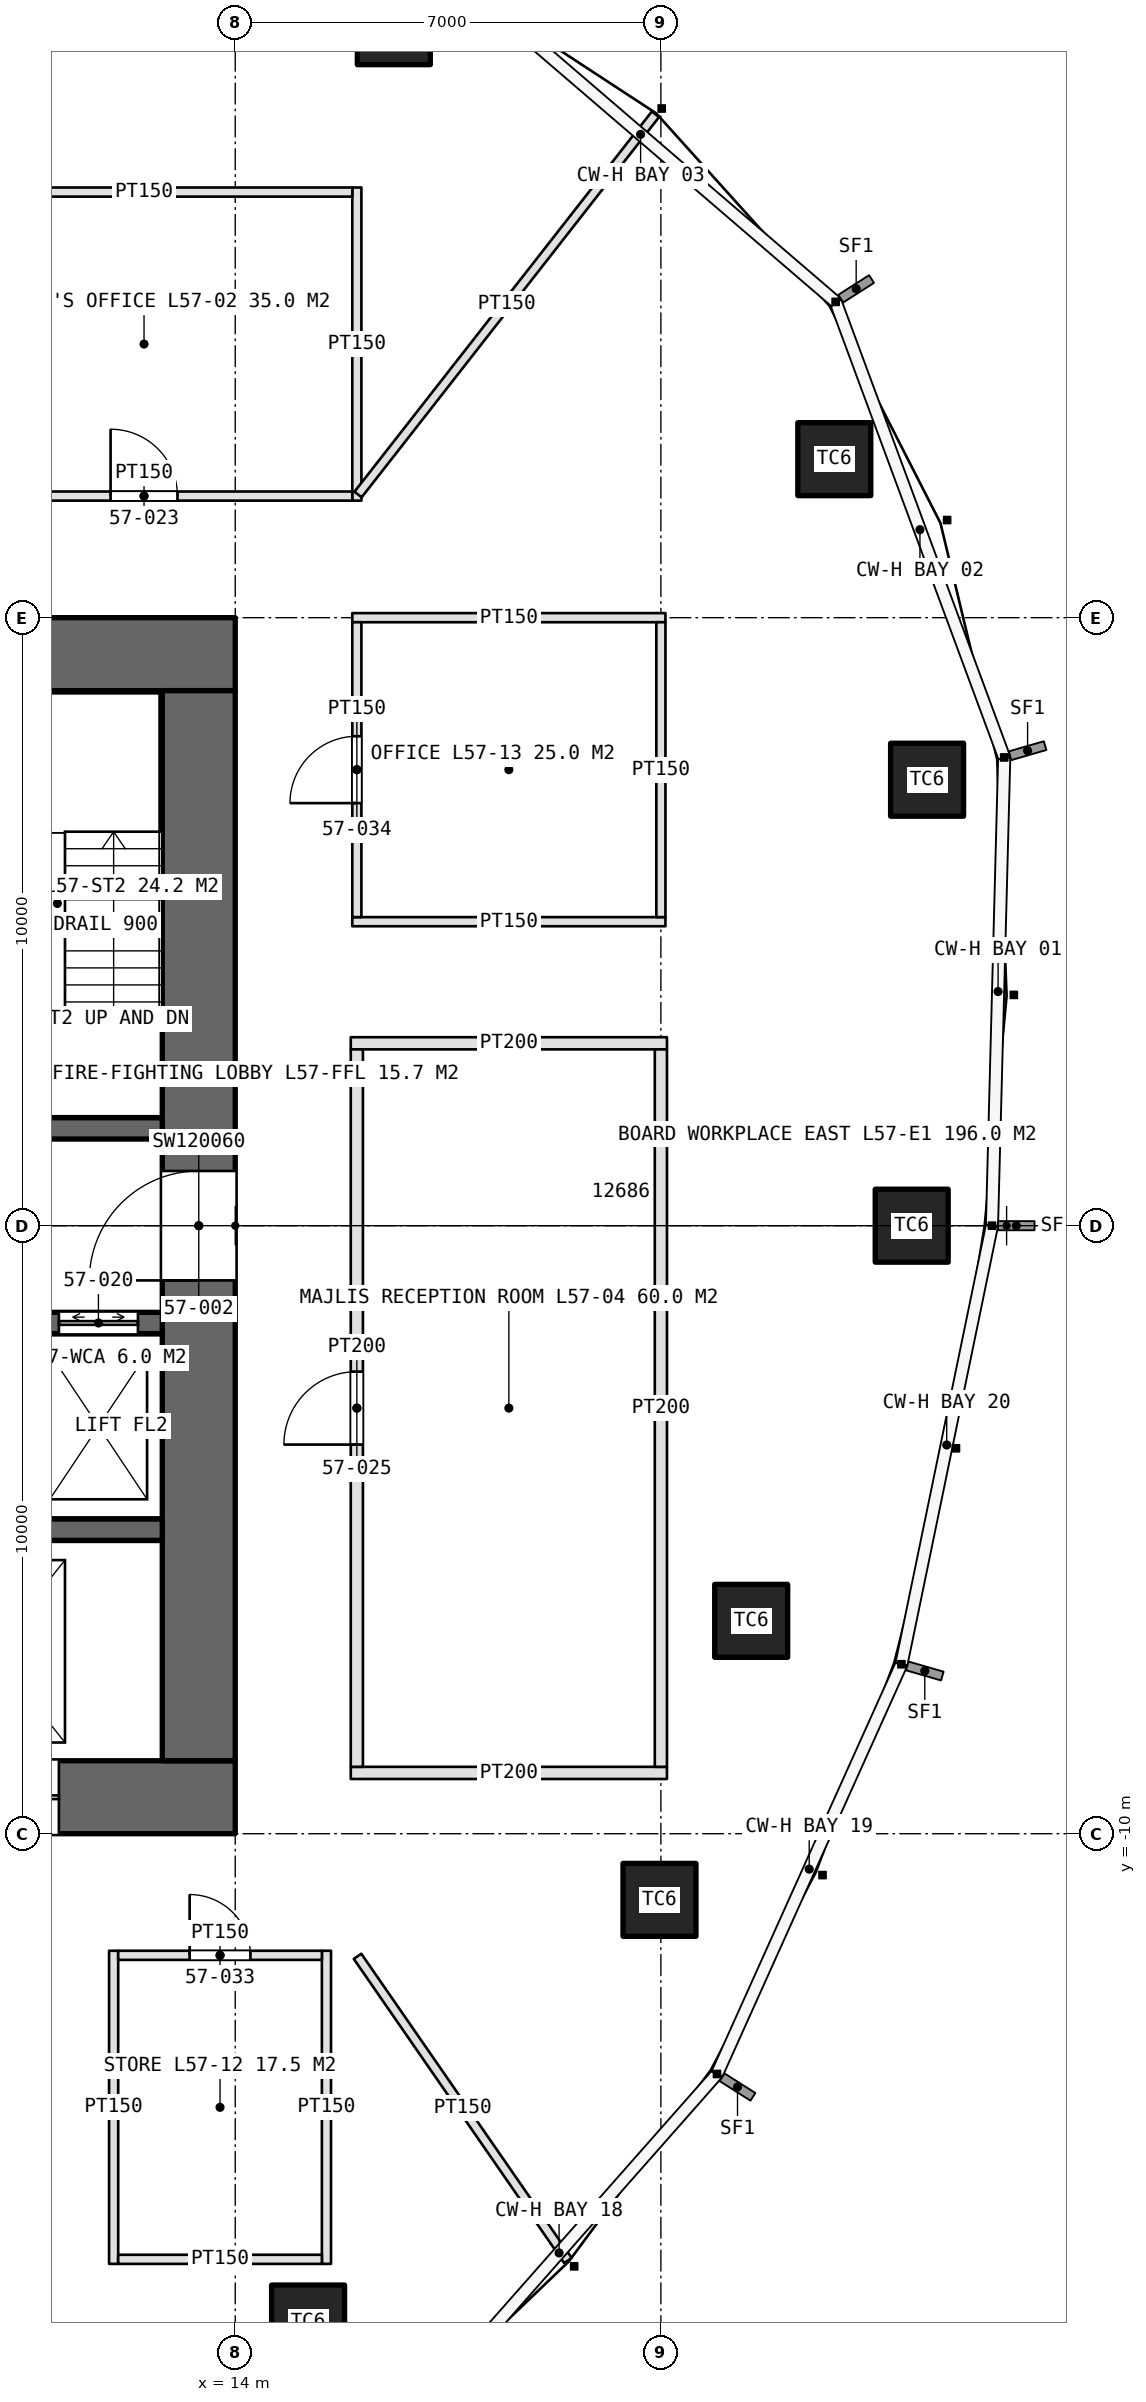
"""IFC4 building model, lengths in metres.
Left out: names, types, materials, properties, quantities, classifications, styles, units other than length and angle.
Written with IfcOpenShell. Run it as: python <this file> out.ifc"""

import sys

from ifc_helpers import new_model, si_unit, direction, frame, frame_2d, origin, origin_2d, place, context, subcontext, project, spatial, rectangle, extrude, element, fill, save


model = new_model("IFC4")
c1 = context("Model", 3, precision=1e-05, world=origin(), true_north=direction((0.0, 1.0)))
c2 = subcontext(c1, "Body", "Model", "MODEL_VIEW")
j1 = project(units=[si_unit("LENGTHUNIT", "METRE"), si_unit("PLANEANGLEUNIT", "RADIAN")], contexts=[c1])
p1 = place(None, origin())
s1 = spatial("IfcSite", under=j1, at=p1, CompositionType="ELEMENT")
p2 = place(p1, origin())
s2 = spatial("IfcBuilding", under=s1, at=p2, CompositionType="ELEMENT")
p3 = place(p2, frame((0.0, 0.0, 257.8)))
s3 = spatial("IfcBuildingStorey", under=s2, at=p3, CompositionType="ELEMENT", Elevation=257.8)
p4 = place(p3, frame((-14.0, -9.4, 0.0), z_axis=(0.0, 0.0, 1.0), x_axis=(1.0, 0.0, 0.0)))
e1 = element("IfcWall", 1, at=p4, inside=s3, PredefinedType="SHEAR", context=c2, shape_type="SweptSolid", body=[
    extrude(rectangle(XDim=28.0, YDim=1.2, at=frame_2d((14.0, 0.0))), origin(), (0.0, 0.0, 1.0), 4.2),
])
p5 = place(p4, frame((22.9, 0.0, 0.0)))
e2 = element("IfcOpeningElement", 2, at=p5, cuts=e1, PredefinedType="OPENING", context=c2, shape_type="SweptSolid", body=[
    extrude(rectangle(XDim=2.2, YDim=2.7, at=frame_2d((1.1, 1.35))), frame((0.0, 0.61, 0.0), z_axis=(0.0, -1.0, 0.0), x_axis=(1.0, 0.0, 0.0)), (0.0, 0.0, 1.0), 1.22),
])
p6 = place(p3, frame((14.0, 9.4, 0.0), z_axis=(0.0, 0.0, 1.0), x_axis=(-1.0, 0.0, 0.0)))
e3 = element("IfcWall", 3, at=p6, inside=s3, PredefinedType="SHEAR", context=c2, shape_type="SweptSolid", body=[
    extrude(rectangle(XDim=28.0, YDim=1.2, at=frame_2d((14.0, 0.0))), origin(), (0.0, 0.0, 1.0), 4.2),
])
p7 = place(p6, frame((24.0, 0.0, 0.0)))
e4 = element("IfcOpeningElement", 4, at=p7, cuts=e3, PredefinedType="OPENING", context=c2, shape_type="SweptSolid", body=[
    extrude(rectangle(XDim=1.0, YDim=2.4, at=frame_2d((0.5, 1.2))), frame((0.0, 0.61, 0.0), z_axis=(0.0, -1.0, 0.0), x_axis=(1.0, 0.0, 0.0)), (0.0, 0.0, 1.0), 1.22),
])
p8 = place(p3, frame((13.4, -8.8, 0.0), z_axis=(0.0, 0.0, 1.0), x_axis=(0.0, 1.0, 0.0)))
e5 = element("IfcWall", 5, at=p8, inside=s3, PredefinedType="SHEAR", context=c2, shape_type="SweptSolid", body=[
    extrude(rectangle(XDim=17.6, YDim=1.2, at=frame_2d((8.8, 0.0))), origin(), (0.0, 0.0, 1.0), 4.2),
])
p9 = place(p8, frame((7.9, 0.0, 0.0)))
e6 = element("IfcOpeningElement", 6, at=p9, cuts=e5, PredefinedType="OPENING", context=c2, shape_type="SweptSolid", body=[
    extrude(rectangle(XDim=1.8, YDim=2.4, at=frame_2d((0.9, 1.2))), frame((0.0, 0.61, 0.0), z_axis=(0.0, -1.0, 0.0), x_axis=(1.0, 0.0, 0.0)), (0.0, 0.0, 1.0), 1.22),
])
p10 = place(p3, frame((7.2, 1.6, 0.0), z_axis=(0.0, 0.0, 1.0), x_axis=(1.0, 0.0, 0.0)))
e7 = element("IfcWall", 7, at=p10, inside=s3, PredefinedType="SHEAR", context=c2, shape_type="SweptSolid", body=[
    extrude(rectangle(XDim=5.6, YDim=0.35, at=frame_2d((2.8, 0.0))), origin(), (0.0, 0.0, 1.0), 4.2),
])
p11 = place(p10, frame((0.6, 0.0, 0.0)))
e8 = element("IfcOpeningElement", 8, at=p11, cuts=e7, PredefinedType="OPENING", context=c2, shape_type="SweptSolid", body=[
    extrude(rectangle(XDim=1.0, YDim=2.4, at=frame_2d((0.5, 1.2))), frame((0.0, 0.185, 0.0), z_axis=(0.0, -1.0, 0.0), x_axis=(1.0, 0.0, 0.0)), (0.0, 0.0, 1.0), 0.37),
])
p12 = place(p3, frame((7.2, -1.6, 0.0), z_axis=(0.0, 0.0, 1.0), x_axis=(1.0, 0.0, 0.0)))
e9 = element("IfcWall", 9, at=p12, inside=s3, PredefinedType="SHEAR", context=c2, shape_type="SweptSolid", body=[
    extrude(rectangle(XDim=5.6, YDim=0.35, at=frame_2d((2.8, 0.0))), origin(), (0.0, 0.0, 1.0), 4.2),
])
p13 = place(p12, frame((0.9, 0.0, 0.0)))
e10 = element("IfcOpeningElement", 10, at=p13, cuts=e9, PredefinedType="OPENING", context=c2, shape_type="SweptSolid", body=[
    extrude(rectangle(XDim=1.3, YDim=2.4, at=frame_2d((0.65, 1.2))), frame((0.0, 0.185, 0.0), z_axis=(0.0, -1.0, 0.0), x_axis=(1.0, 0.0, 0.0)), (0.0, 0.0, 1.0), 0.37),
])
p14 = place(p12, frame((3.9, 0.0, 0.0)))
e11 = element("IfcOpeningElement", 11, at=p14, cuts=e9, PredefinedType="OPENING", context=c2, shape_type="SweptSolid", body=[
    extrude(rectangle(XDim=1.3, YDim=2.4, at=frame_2d((0.65, 1.2))), frame((0.0, 0.185, 0.0), z_axis=(0.0, -1.0, 0.0), x_axis=(1.0, 0.0, 0.0)), (0.0, 0.0, 1.0), 0.37),
])
p15 = place(p3, frame((7.2, -5.0, 0.0), z_axis=(0.0, 0.0, 1.0), x_axis=(1.0, 0.0, 0.0)))
e12 = element("IfcWall", 12, at=p15, inside=s3, PredefinedType="SHEAR", context=c2, shape_type="SweptSolid", body=[
    extrude(rectangle(XDim=5.6, YDim=0.35, at=frame_2d((2.8, 0.0))), origin(), (0.0, 0.0, 1.0), 4.2),
])
for number, where, z_axis, x_axis in (
    (13, (25.125, 0.0, 0.0), (0.0, 0.0, 1.0), (1.0, 0.0, 0.0)),
    (14, (25.378, 7.335, 0.0), (0.0, 0.0, 1.0), (1.0, 0.0, 0.0)),
    (15, (23.852, 12.607, 0.0), (0.0, 0.0, 1.0), (1.0, 0.0, 0.0)),
    (16, (16.608, 19.695, 0.0), (0.0, 0.0, 1.0), (1.0, 0.0, 0.0)),
    (17, (15.198, -18.023, 0.0), (0.0, 0.0, 1.0), (1.0, 0.0, 0.0)),
    (18, (20.977, -11.088, 0.0), (0.0, 0.0, 1.0), (1.0, 0.0, 0.0)),
    (19, (22.485, -6.499, 0.0), (0.0, 0.0, 1.0), (1.0, 0.0, 0.0)),
):
    element("IfcColumn", number, at=place(p3, frame(where, z_axis=z_axis, x_axis=x_axis)), inside=s3, PredefinedType="COLUMN", context=c2, shape_type="SweptSolid", body=[
        extrude(rectangle(XDim=1.2, YDim=1.2, at=origin_2d()), origin(), (0.0, 0.0, 1.0), 4.2),
    ])
p16 = place(p3, frame((16.0, 11.925, 0.0), z_axis=(0.0, 0.0, 1.0), x_axis=(0.0, 1.0, 0.0)))
e20 = element("IfcWall", 20, at=p16, inside=s3, PredefinedType="PARTITIONING", context=c2, shape_type="SweptSolid", body=[
    extrude(rectangle(XDim=5.15, YDim=0.15, at=frame_2d((2.575, 0.0))), origin(), (0.0, 0.0, 1.0), 3.0),
])
p17 = place(p3, frame((9.075, 12.0, 0.0), z_axis=(0.0, 0.0, 1.0), x_axis=(1.0, 0.0, 0.0)))
e21 = element("IfcWall", 21, at=p17, inside=s3, PredefinedType="PARTITIONING", context=c2, shape_type="SweptSolid", body=[
    extrude(rectangle(XDim=6.85, YDim=0.15, at=frame_2d((3.425, 0.0))), origin(), (0.0, 0.0, 1.0), 3.0),
])
p18 = place(p17, frame((2.875, 0.0, 0.0)))
e22 = element("IfcOpeningElement", 22, at=p18, cuts=e21, PredefinedType="OPENING", context=c2, shape_type="SweptSolid", body=[
    extrude(rectangle(XDim=1.1, YDim=2.3, at=frame_2d((0.55, 1.15))), frame((0.0, 0.085, 0.0), z_axis=(0.0, -1.0, 0.0), x_axis=(1.0, 0.0, 0.0)), (0.0, 0.0, 1.0), 0.17),
])
p19 = place(p3, frame((9.075, 17.0, 0.0), z_axis=(0.0, 0.0, 1.0), x_axis=(1.0, 0.0, 0.0)))
e23 = element("IfcWall", 23, at=p19, inside=s3, PredefinedType="PARTITIONING", context=c2, shape_type="SweptSolid", body=[
    extrude(rectangle(XDim=6.85, YDim=0.15, at=frame_2d((3.425, 0.0))), origin(), (0.0, 0.0, 1.0), 3.0),
])
for number, where, z_axis, x_axis in (
    (24, (15.9, -9.0, 0.0), (0.0, 0.0, 1.0), (1.0, 0.0, 0.0)),
    (25, (15.9, 3.0, 0.0), (0.0, 0.0, 1.0), (1.0, 0.0, 0.0)),
):
    element("IfcWall", number, at=place(p3, frame(where, z_axis=z_axis, x_axis=x_axis)), inside=s3, PredefinedType="PARTITIONING", context=c2, shape_type="SweptSolid", body=[
        extrude(rectangle(XDim=5.2, YDim=0.2, at=frame_2d((2.6, 0.0))), origin(), (0.0, 0.0, 1.0), 3.0),
    ])
p20 = place(p3, frame((16.0, -8.9, 0.0), z_axis=(0.0, 0.0, 1.0), x_axis=(0.0, 1.0, 0.0)))
e26 = element("IfcWall", 26, at=p20, inside=s3, PredefinedType="PARTITIONING", context=c2, shape_type="SweptSolid", body=[
    extrude(rectangle(XDim=11.8, YDim=0.2, at=frame_2d((5.9, 0.0))), origin(), (0.0, 0.0, 1.0), 3.0),
])
p21 = place(p20, frame((5.3, 0.0, 0.0)))
e27 = element("IfcOpeningElement", 27, at=p21, cuts=e26, PredefinedType="OPENING", context=c2, shape_type="SweptSolid", body=[
    extrude(rectangle(XDim=1.2, YDim=2.4, at=frame_2d((0.6, 1.2))), frame((0.0, 0.11, 0.0), z_axis=(0.0, -1.0, 0.0), x_axis=(1.0, 0.0, 0.0)), (0.0, 0.0, 1.0), 0.22),
])
p22 = place(p3, frame((21.0, -8.9, 0.0), z_axis=(0.0, 0.0, 1.0), x_axis=(0.0, 1.0, 0.0)))
e28 = element("IfcWall", 28, at=p22, inside=s3, PredefinedType="PARTITIONING", context=c2, shape_type="SweptSolid", body=[
    extrude(rectangle(XDim=11.8, YDim=0.2, at=frame_2d((5.9, 0.0))), origin(), (0.0, 0.0, 1.0), 3.0),
])
for number, where, z_axis, x_axis in (
    (29, (12.0, -11.925, 0.0), (0.0, 0.0, 1.0), (0.0, -1.0, 0.0)),
    (30, (15.5, -11.925, 0.0), (0.0, 0.0, 1.0), (0.0, -1.0, 0.0)),
):
    element("IfcWall", number, at=place(p3, frame(where, z_axis=z_axis, x_axis=x_axis)), inside=s3, PredefinedType="PARTITIONING", context=c2, shape_type="SweptSolid", body=[
        extrude(rectangle(XDim=5.15, YDim=0.15, at=frame_2d((2.575, 0.0))), origin(), (0.0, 0.0, 1.0), 3.0),
    ])
p23 = place(p3, frame((12.075, -12.0, 0.0), z_axis=(0.0, 0.0, 1.0), x_axis=(1.0, 0.0, 0.0)))
e31 = element("IfcWall", 31, at=p23, inside=s3, PredefinedType="PARTITIONING", context=c2, shape_type="SweptSolid", body=[
    extrude(rectangle(XDim=3.35, YDim=0.15, at=frame_2d((1.675, 0.0))), origin(), (0.0, 0.0, 1.0), 3.0),
])
p24 = place(p23, frame((1.175, 0.0, 0.0)))
e32 = element("IfcOpeningElement", 32, at=p24, cuts=e31, PredefinedType="OPENING", context=c2, shape_type="SweptSolid", body=[
    extrude(rectangle(XDim=1.0, YDim=2.2, at=frame_2d((0.5, 1.1))), frame((0.0, 0.085, 0.0), z_axis=(0.0, -1.0, 0.0), x_axis=(1.0, 0.0, 0.0)), (0.0, 0.0, 1.0), 0.17),
])
p25 = place(p3, frame((12.075, -17.0, 0.0), z_axis=(0.0, 0.0, 1.0), x_axis=(1.0, 0.0, 0.0)))
e33 = element("IfcWall", 33, at=p25, inside=s3, PredefinedType="PARTITIONING", context=c2, shape_type="SweptSolid", body=[
    extrude(rectangle(XDim=3.35, YDim=0.15, at=frame_2d((1.675, 0.0))), origin(), (0.0, 0.0, 1.0), 3.0),
])
for number, where, z_axis, x_axis in (
    (34, (15.925, 5.0, 0.0), (0.0, 0.0, 1.0), (1.0, 0.0, 0.0)),
    (35, (15.925, 10.0, 0.0), (0.0, 0.0, 1.0), (1.0, 0.0, 0.0)),
):
    element("IfcWall", number, at=place(p3, frame(where, z_axis=z_axis, x_axis=x_axis)), inside=s3, PredefinedType="PARTITIONING", context=c2, shape_type="SweptSolid", body=[
        extrude(rectangle(XDim=5.15, YDim=0.15, at=frame_2d((2.575, 0.0))), origin(), (0.0, 0.0, 1.0), 3.0),
    ])
p26 = place(p3, frame((16.0, 5.075, 0.0), z_axis=(0.0, 0.0, 1.0), x_axis=(0.0, 1.0, 0.0)))
e36 = element("IfcWall", 36, at=p26, inside=s3, PredefinedType="PARTITIONING", context=c2, shape_type="SweptSolid", body=[
    extrude(rectangle(XDim=4.85, YDim=0.15, at=frame_2d((2.425, 0.0))), origin(), (0.0, 0.0, 1.0), 3.0),
])
p27 = place(p26, frame((1.875, 0.0, 0.0)))
e37 = element("IfcOpeningElement", 37, at=p27, cuts=e36, PredefinedType="OPENING", context=c2, shape_type="SweptSolid", body=[
    extrude(rectangle(XDim=1.1, YDim=2.3, at=frame_2d((0.55, 1.15))), frame((0.0, 0.085, 0.0), z_axis=(0.0, -1.0, 0.0), x_axis=(1.0, 0.0, 0.0)), (0.0, 0.0, 1.0), 0.17),
])
p28 = place(p3, frame((21.0, 5.075, 0.0), z_axis=(0.0, 0.0, 1.0), x_axis=(0.0, 1.0, 0.0)))
e38 = element("IfcWall", 38, at=p28, inside=s3, PredefinedType="PARTITIONING", context=c2, shape_type="SweptSolid", body=[
    extrude(rectangle(XDim=4.85, YDim=0.15, at=frame_2d((2.425, 0.0))), origin(), (0.0, 0.0, 1.0), 3.0),
])
p29 = place(p3, frame((16.011, -12.016, 0.0), z_axis=(0.0, 0.0, 1.0), x_axis=(0.568863489071, -0.822431961199, 0.0)))
e39 = element("IfcWall", 39, at=p29, inside=s3, PredefinedType="PARTITIONING", context=c2, shape_type="SweptSolid", body=[
    extrude(rectangle(XDim=6.083, YDim=0.15, at=frame_2d((3.042, 0.0))), origin(), (0.0, 0.0, 1.0), 3.0),
])
p30 = place(p3, frame((16.02, 12.026, 0.0), z_axis=(0.0, 0.0, 1.0), x_axis=(0.616031272047, 0.787721696959, 0.0)))
e40 = element("IfcWall", 40, at=p30, inside=s3, PredefinedType="PARTITIONING", context=c2, shape_type="SweptSolid", body=[
    extrude(rectangle(XDim=7.939, YDim=0.15, at=frame_2d((3.969, 0.0))), origin(), (0.0, 0.0, 1.0), 3.0),
])
p31 = place(p9, origin())
e41 = element("IfcDoor", 41, at=p31, inside=s3, OperationType="DOUBLE_DOOR_SINGLE_SWING", PredefinedType="DOOR", context=c2, shape_type="SweptSolid", body=[
    extrude(rectangle(XDim=1.8, YDim=2.4, at=frame_2d((0.9, 1.2))), frame((0.0, 0.025, 0.0), z_axis=(0.0, -1.0, 0.0), x_axis=(1.0, 0.0, 0.0)), (0.0, 0.0, 1.0), 0.05),
])
fill(e6, e41)
p32 = place(p14, origin())
e42 = element("IfcDoor", 42, at=p32, inside=s3, OperationType="DOUBLE_DOOR_SLIDING", PredefinedType="DOOR", context=c2, shape_type="SweptSolid", body=[
    extrude(rectangle(XDim=1.3, YDim=2.4, at=frame_2d((0.65, 1.2))), frame((0.0, 0.025, 0.0), z_axis=(0.0, -1.0, 0.0), x_axis=(1.0, 0.0, 0.0)), (0.0, 0.0, 1.0), 0.05),
])
fill(e11, e42)
p33 = place(p5, origin())
e43 = element("IfcDoor", 43, at=p33, inside=s3, OperationType="DOUBLE_DOOR_SLIDING", PredefinedType="DOOR", context=c2, shape_type="SweptSolid", body=[
    extrude(rectangle(XDim=2.2, YDim=2.7, at=frame_2d((1.1, 1.35))), frame((0.0, 0.025, 0.0), z_axis=(0.0, -1.0, 0.0), x_axis=(1.0, 0.0, 0.0)), (0.0, 0.0, 1.0), 0.05),
])
fill(e2, e43)
p34 = place(p18, origin())
e44 = element("IfcDoor", 44, at=p34, inside=s3, OperationType="SINGLE_SWING_LEFT", PredefinedType="DOOR", context=c2, shape_type="SweptSolid", body=[
    extrude(rectangle(XDim=1.1, YDim=2.3, at=frame_2d((0.55, 1.15))), frame((0.0, 0.025, 0.0), z_axis=(0.0, -1.0, 0.0), x_axis=(1.0, 0.0, 0.0)), (0.0, 0.0, 1.0), 0.05),
])
fill(e22, e44)
p35 = place(p21, origin())
e45 = element("IfcDoor", 45, at=p35, inside=s3, OperationType="SINGLE_SWING_LEFT", PredefinedType="DOOR", context=c2, shape_type="SweptSolid", body=[
    extrude(rectangle(XDim=1.2, YDim=2.4, at=frame_2d((0.6, 1.2))), frame((0.0, 0.025, 0.0), z_axis=(0.0, -1.0, 0.0), x_axis=(1.0, 0.0, 0.0)), (0.0, 0.0, 1.0), 0.05),
])
fill(e27, e45)
p36 = place(p24, origin())
e46 = element("IfcDoor", 46, at=p36, inside=s3, OperationType="SINGLE_SWING_LEFT", PredefinedType="DOOR", context=c2, shape_type="SweptSolid", body=[
    extrude(rectangle(XDim=1.0, YDim=2.2, at=frame_2d((0.5, 1.1))), frame((0.0, 0.025, 0.0), z_axis=(0.0, -1.0, 0.0), x_axis=(1.0, 0.0, 0.0)), (0.0, 0.0, 1.0), 0.05),
])
fill(e32, e46)
p37 = place(p27, origin())
e47 = element("IfcDoor", 47, at=p37, inside=s3, OperationType="SINGLE_SWING_LEFT", PredefinedType="DOOR", context=c2, shape_type="SweptSolid", body=[
    extrude(rectangle(XDim=1.1, YDim=2.3, at=frame_2d((0.55, 1.15))), frame((0.0, 0.025, 0.0), z_axis=(0.0, -1.0, 0.0), x_axis=(1.0, 0.0, 0.0)), (0.0, 0.0, 1.0), 0.05),
])
fill(e37, e47)
save(model, sys.argv[1])
